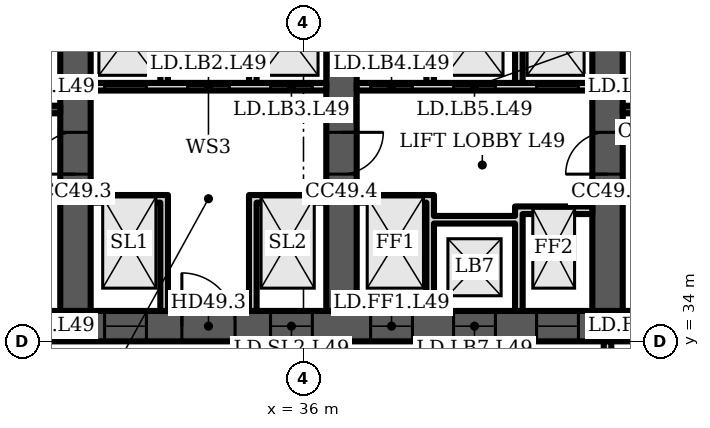
"""IFC4 building model, lengths in metres.
Left out: names, types, materials, properties, quantities, classifications, styles, units other than length and angle.
Written with IfcOpenShell. Run it as: python <this file> out.ifc"""

import sys

from ifc_helpers import new_model, si_unit, direction, frame, frame_2d, origin, place, context, subcontext, project, spatial, polyline, rectangle, outline, extrude, element, fill, save


model = new_model("IFC4")
c1 = context("Model", 3, precision=1e-05, world=origin(), true_north=direction((0.0, 1.0)))
c2 = subcontext(c1, "Body", "Model", "MODEL_VIEW")
j1 = project(units=[si_unit("LENGTHUNIT", "METRE"), si_unit("PLANEANGLEUNIT", "RADIAN")], contexts=[c1])
p1 = place(None, origin())
s1 = spatial("IfcSite", under=j1, at=p1, CompositionType="ELEMENT")
p2 = place(p1, origin())
s2 = spatial("IfcBuilding", under=s1, at=p2, CompositionType="ELEMENT")
p3 = place(p2, frame((0.0, 0.0, 198.7)))
s3 = spatial("IfcBuildingStorey", under=s2, at=p3, CompositionType="ELEMENT", Elevation=198.7)
p4 = place(p3, frame((16.0, 34.4, 0.0), z_axis=(0.0, 0.0, 1.0), x_axis=(1.0, 0.0, 0.0)))
e1 = element("IfcWall", 1, at=p4, inside=s3, PredefinedType="SHEAR", context=c2, shape_type="SweptSolid", body=[
    extrude(rectangle(XDim=42.0, YDim=0.8, at=frame_2d((21.0, 0.0))), origin(), (0.0, 0.0, 1.0), 3.6),
])
p5 = place(p4, frame((1.75, 0.0, 0.0)))
e2 = element("IfcOpeningElement", 2, at=p5, cuts=e1, PredefinedType="OPENING", context=c2, shape_type="SweptSolid", body=[
    extrude(rectangle(XDim=1.0, YDim=2.1, at=frame_2d((0.5, 1.05))), frame((0.0, 0.41, 0.0), z_axis=(0.0, -1.0, 0.0), x_axis=(1.0, 0.0, 0.0)), (0.0, 0.0, 1.0), 0.82),
])
p6 = place(p4, frame((4.65, 0.0, 0.0)))
e3 = element("IfcOpeningElement", 3, at=p6, cuts=e1, PredefinedType="OPENING", context=c2, shape_type="SweptSolid", body=[
    extrude(rectangle(XDim=1.0, YDim=2.1, at=frame_2d((0.5, 1.05))), frame((0.0, 0.41, 0.0), z_axis=(0.0, -1.0, 0.0), x_axis=(1.0, 0.0, 0.0)), (0.0, 0.0, 1.0), 0.82),
])
p7 = place(p4, frame((7.65, 0.0, 0.0)))
e4 = element("IfcOpeningElement", 4, at=p7, cuts=e1, PredefinedType="OPENING", context=c2, shape_type="SweptSolid", body=[
    extrude(rectangle(XDim=1.2, YDim=2.1, at=frame_2d((0.6, 1.05))), frame((0.0, 0.41, 0.0), z_axis=(0.0, -1.0, 0.0), x_axis=(1.0, 0.0, 0.0)), (0.0, 0.0, 1.0), 0.82),
])
p8 = place(p4, frame((14.767, 0.0, 0.0)))
e5 = element("IfcOpeningElement", 5, at=p8, cuts=e1, PredefinedType="OPENING", context=c2, shape_type="SweptSolid", body=[
    extrude(rectangle(XDim=1.1, YDim=2.1, at=frame_2d((0.55, 1.05))), frame((0.0, 0.41, 0.0), z_axis=(0.0, -1.0, 0.0), x_axis=(1.0, 0.0, 0.0)), (0.0, 0.0, 1.0), 0.82),
])
p9 = place(p4, frame((19.133, 0.0, 0.0)))
e6 = element("IfcOpeningElement", 6, at=p9, cuts=e1, PredefinedType="OPENING", context=c2, shape_type="SweptSolid", body=[
    extrude(rectangle(XDim=1.1, YDim=2.1, at=frame_2d((0.55, 1.05))), frame((0.0, 0.41, 0.0), z_axis=(0.0, -1.0, 0.0), x_axis=(1.0, 0.0, 0.0)), (0.0, 0.0, 1.0), 0.82),
])
p10 = place(p4, frame((16.8, 0.0, 0.0)))
e7 = element("IfcOpeningElement", 7, at=p10, cuts=e1, PredefinedType="OPENING", context=c2, shape_type="SweptSolid", body=[
    extrude(rectangle(XDim=1.4, YDim=2.1, at=frame_2d((0.7, 1.05))), frame((0.0, 0.41, 0.0), z_axis=(0.0, -1.0, 0.0), x_axis=(1.0, 0.0, 0.0)), (0.0, 0.0, 1.0), 0.82),
])
p11 = place(p4, frame((21.767, 0.0, 0.0)))
e8 = element("IfcOpeningElement", 8, at=p11, cuts=e1, PredefinedType="OPENING", context=c2, shape_type="SweptSolid", body=[
    extrude(rectangle(XDim=1.1, YDim=2.1, at=frame_2d((0.55, 1.05))), frame((0.0, 0.41, 0.0), z_axis=(0.0, -1.0, 0.0), x_axis=(1.0, 0.0, 0.0)), (0.0, 0.0, 1.0), 0.82),
])
p12 = place(p4, frame((23.95, 0.0, 0.0)))
e9 = element("IfcOpeningElement", 9, at=p12, cuts=e1, PredefinedType="OPENING", context=c2, shape_type="SweptSolid", body=[
    extrude(rectangle(XDim=1.1, YDim=2.1, at=frame_2d((0.55, 1.05))), frame((0.0, 0.41, 0.0), z_axis=(0.0, -1.0, 0.0), x_axis=(1.0, 0.0, 0.0)), (0.0, 0.0, 1.0), 0.82),
])
p13 = place(p4, frame((26.133, 0.0, 0.0)))
e10 = element("IfcOpeningElement", 10, at=p13, cuts=e1, PredefinedType="OPENING", context=c2, shape_type="SweptSolid", body=[
    extrude(rectangle(XDim=1.1, YDim=2.1, at=frame_2d((0.55, 1.05))), frame((0.0, 0.41, 0.0), z_axis=(0.0, -1.0, 0.0), x_axis=(1.0, 0.0, 0.0)), (0.0, 0.0, 1.0), 0.82),
])
p14 = place(p4, frame((33.15, 0.0, 0.0)))
e11 = element("IfcOpeningElement", 11, at=p14, cuts=e1, PredefinedType="OPENING", context=c2, shape_type="SweptSolid", body=[
    extrude(rectangle(XDim=1.2, YDim=2.1, at=frame_2d((0.6, 1.05))), frame((0.0, 0.41, 0.0), z_axis=(0.0, -1.0, 0.0), x_axis=(1.0, 0.0, 0.0)), (0.0, 0.0, 1.0), 0.82),
])
p15 = place(p4, frame((35.817, 0.0, 0.0)))
e12 = element("IfcOpeningElement", 12, at=p15, cuts=e1, PredefinedType="OPENING", context=c2, shape_type="SweptSolid", body=[
    extrude(rectangle(XDim=1.0, YDim=2.1, at=frame_2d((0.5, 1.05))), frame((0.0, 0.41, 0.0), z_axis=(0.0, -1.0, 0.0), x_axis=(1.0, 0.0, 0.0)), (0.0, 0.0, 1.0), 0.82),
])
p16 = place(p4, frame((39.95, 0.0, 0.0)))
e13 = element("IfcOpeningElement", 13, at=p16, cuts=e1, PredefinedType="OPENING", context=c2, shape_type="SweptSolid", body=[
    extrude(rectangle(XDim=1.0, YDim=2.1, at=frame_2d((0.5, 1.05))), frame((0.0, 0.41, 0.0), z_axis=(0.0, -1.0, 0.0), x_axis=(1.0, 0.0, 0.0)), (0.0, 0.0, 1.0), 0.82),
])
p17 = place(p4, frame((37.767, 0.0, 0.0)))
e14 = element("IfcOpeningElement", 14, at=p17, cuts=e1, PredefinedType="OPENING", context=c2, shape_type="SweptSolid", body=[
    extrude(rectangle(XDim=1.4, YDim=2.1, at=frame_2d((0.7, 1.05))), frame((0.0, 0.41, 0.0), z_axis=(0.0, -1.0, 0.0), x_axis=(1.0, 0.0, 0.0)), (0.0, 0.0, 1.0), 0.82),
])
p18 = place(p3, frame((30.0, 34.8, 0.0), z_axis=(0.0, 0.0, 1.0), x_axis=(0.0, 1.0, 0.0)))
e15 = element("IfcWall", 15, at=p18, inside=s3, PredefinedType="SHEAR", context=c2, shape_type="SweptSolid", body=[
    extrude(rectangle(XDim=14.374, YDim=0.8, at=frame_2d((7.187, 0.0))), origin(), (0.0, 0.0, 1.0), 3.6),
])
p19 = place(p18, frame((3.6, 0.0, 0.0)))
e16 = element("IfcOpeningElement", 16, at=p19, cuts=e15, PredefinedType="OPENING", context=c2, shape_type="SweptSolid", body=[
    extrude(rectangle(XDim=1.1, YDim=2.1, at=frame_2d((0.55, 1.05))), frame((0.0, 0.41, 0.0), z_axis=(0.0, -1.0, 0.0), x_axis=(1.0, 0.0, 0.0)), (0.0, 0.0, 1.0), 0.82),
])
p20 = place(p3, frame((37.0, 34.8, 0.0), z_axis=(0.0, 0.0, 1.0), x_axis=(0.0, 1.0, 0.0)))
e17 = element("IfcWall", 17, at=p20, inside=s3, PredefinedType="SHEAR", context=c2, shape_type="SweptSolid", body=[
    extrude(rectangle(XDim=14.987, YDim=0.8, at=frame_2d((7.493, 0.0))), origin(), (0.0, 0.0, 1.0), 3.6),
])
p21 = place(p20, frame((11.312, 0.0, 0.0)))
e18 = element("IfcOpeningElement", 18, at=p21, cuts=e17, PredefinedType="OPENING", context=c2, shape_type="SweptSolid", body=[
    extrude(rectangle(XDim=1.0, YDim=2.1, at=frame_2d((0.5, 1.05))), frame((0.0, 0.41, 0.0), z_axis=(0.0, -1.0, 0.0), x_axis=(1.0, 0.0, 0.0)), (0.0, 0.0, 1.0), 0.82),
])
p22 = place(p20, frame((3.6, 0.0, 0.0)))
e19 = element("IfcOpeningElement", 19, at=p22, cuts=e17, PredefinedType="OPENING", context=c2, shape_type="SweptSolid", body=[
    extrude(rectangle(XDim=1.1, YDim=2.1, at=frame_2d((0.55, 1.05))), frame((0.0, 0.41, 0.0), z_axis=(0.0, -1.0, 0.0), x_axis=(1.0, 0.0, 0.0)), (0.0, 0.0, 1.0), 0.82),
])
p23 = place(p3, frame((44.0, 34.8, 0.0), z_axis=(0.0, 0.0, 1.0), x_axis=(0.0, 1.0, 0.0)))
e20 = element("IfcWall", 20, at=p23, inside=s3, PredefinedType="SHEAR", context=c2, shape_type="SweptSolid", body=[
    extrude(rectangle(XDim=14.374, YDim=0.8, at=frame_2d((7.187, 0.0))), origin(), (0.0, 0.0, 1.0), 3.6),
])
p24 = place(p23, frame((11.312, 0.0, 0.0)))
e21 = element("IfcOpeningElement", 21, at=p24, cuts=e20, PredefinedType="OPENING", context=c2, shape_type="SweptSolid", body=[
    extrude(rectangle(XDim=1.0, YDim=2.1, at=frame_2d((0.5, 1.05))), frame((0.0, 0.41, 0.0), z_axis=(0.0, -1.0, 0.0), x_axis=(1.0, 0.0, 0.0)), (0.0, 0.0, 1.0), 0.82),
])
p25 = place(p23, frame((3.6, 0.0, 0.0)))
e22 = element("IfcOpeningElement", 22, at=p25, cuts=e20, PredefinedType="OPENING", context=c2, shape_type="SweptSolid", body=[
    extrude(rectangle(XDim=1.1, YDim=2.1, at=frame_2d((0.55, 1.05))), frame((0.0, 0.41, 0.0), z_axis=(0.0, -1.0, 0.0), x_axis=(1.0, 0.0, 0.0)), (0.0, 0.0, 1.0), 0.82),
])
p26 = place(p3, frame((23.4, 40.1, 0.0), z_axis=(0.0, 0.0, 1.0), x_axis=(1.0, 0.0, 0.0)))
e23 = element("IfcWall", 23, at=p26, inside=s3, PredefinedType="SHEAR", context=c2, shape_type="SweptSolid", body=[
    extrude(rectangle(XDim=6.2, YDim=0.2, at=frame_2d((3.1, 0.0))), origin(), (0.0, 0.0, 1.0), 3.15),
])
p27 = place(p26, frame((3.525, 0.0, 0.0)))
e24 = element("IfcOpeningElement", 24, at=p27, cuts=e23, PredefinedType="OPENING", context=c2, shape_type="SweptSolid", body=[
    extrude(rectangle(XDim=1.2, YDim=2.1, at=frame_2d((0.6, 1.05))), frame((0.0, 0.11, 0.0), z_axis=(0.0, -1.0, 0.0), x_axis=(1.0, 0.0, 0.0)), (0.0, 0.0, 1.0), 0.22),
])
p28 = place(p26, frame((0.575, 0.0, 0.0)))
e25 = element("IfcOpeningElement", 25, at=p28, cuts=e23, PredefinedType="OPENING", context=c2, shape_type="SweptSolid", body=[
    extrude(rectangle(XDim=0.9, YDim=2.1, at=frame_2d((0.45, 1.05))), frame((0.0, 0.11, 0.0), z_axis=(0.0, -1.0, 0.0), x_axis=(1.0, 0.0, 0.0)), (0.0, 0.0, 1.0), 0.22),
])
p29 = place(p3, frame((30.4, 40.7, 0.0), z_axis=(0.0, 0.0, 1.0), x_axis=(1.0, 0.0, 0.0)))
e26 = element("IfcWall", 26, at=p29, inside=s3, PredefinedType="PARTITIONING", context=c2, shape_type="SweptSolid", body=[
    extrude(rectangle(XDim=6.2, YDim=0.2, at=frame_2d((3.1, 0.0))), origin(), (0.0, 0.0, 1.0), 3.15),
])
p30 = place(p29, frame((0.367, 0.0, 0.0)))
e27 = element("IfcOpeningElement", 27, at=p30, cuts=e26, PredefinedType="OPENING", context=c2, shape_type="SweptSolid", body=[
    extrude(rectangle(XDim=1.1, YDim=2.1, at=frame_2d((0.55, 1.05))), frame((0.0, 0.11, 0.0), z_axis=(0.0, -1.0, 0.0), x_axis=(1.0, 0.0, 0.0)), (0.0, 0.0, 1.0), 0.22),
])
p31 = place(p29, frame((2.55, 0.0, 0.0)))
e28 = element("IfcOpeningElement", 28, at=p31, cuts=e26, PredefinedType="OPENING", context=c2, shape_type="SweptSolid", body=[
    extrude(rectangle(XDim=1.1, YDim=2.1, at=frame_2d((0.55, 1.05))), frame((0.0, 0.11, 0.0), z_axis=(0.0, -1.0, 0.0), x_axis=(1.0, 0.0, 0.0)), (0.0, 0.0, 1.0), 0.22),
])
p32 = place(p29, frame((4.733, 0.0, 0.0)))
e29 = element("IfcOpeningElement", 29, at=p32, cuts=e26, PredefinedType="OPENING", context=c2, shape_type="SweptSolid", body=[
    extrude(rectangle(XDim=1.1, YDim=2.1, at=frame_2d((0.55, 1.05))), frame((0.0, 0.11, 0.0), z_axis=(0.0, -1.0, 0.0), x_axis=(1.0, 0.0, 0.0)), (0.0, 0.0, 1.0), 0.22),
])
p33 = place(p3, origin())
e30 = element("IfcWall", 30, at=p33, inside=s3, PredefinedType="PARTITIONING", context=c2, shape_type="SweptSolid", body=[
    extrude(outline(polyline([(32.233, 37.65), (30.4, 37.65), (30.4, 37.85), (32.233, 37.85), (32.433, 37.85), (32.433, 34.8), (32.233, 34.8), (32.233, 37.65)])), origin(), (0.0, 0.0, 1.0), 3.15),
])
p34 = place(p3, origin())
e31 = element("IfcWall", 31, at=p34, inside=s3, PredefinedType="PARTITIONING", context=c2, shape_type="SweptSolid", body=[
    extrude(outline(polyline([(34.567, 37.85), (34.767, 37.85), (36.6, 37.85), (36.6, 37.65), (34.767, 37.65), (34.767, 34.8), (34.567, 34.8), (34.567, 37.85)])), origin(), (0.0, 0.0, 1.0), 3.15),
])
p35 = place(p3, origin())
e32 = element("IfcWall", 32, at=p35, inside=s3, PredefinedType="PARTITIONING", context=c2, shape_type="SweptSolid", body=[
    extrude(outline(polyline([(32.433, 40.8), (32.233, 40.8), (32.233, 43.8), (30.4, 43.8), (30.4, 44.0), (36.6, 44.0), (36.6, 43.8), (34.767, 43.8), (34.767, 40.8), (34.567, 40.8), (34.567, 43.8), (32.433, 43.8), (32.433, 40.8)])), origin(), (0.0, 0.0, 1.0), 3.15),
])
p36 = place(p3, frame((37.4, 40.7, 0.0), z_axis=(0.0, 0.0, 1.0), x_axis=(1.0, 0.0, 0.0)))
e33 = element("IfcWall", 33, at=p36, inside=s3, PredefinedType="PARTITIONING", context=c2, shape_type="SweptSolid", body=[
    extrude(rectangle(XDim=6.2, YDim=0.2, at=frame_2d((3.1, 0.0))), origin(), (0.0, 0.0, 1.0), 3.15),
])
p37 = place(p36, frame((0.367, 0.0, 0.0)))
e34 = element("IfcOpeningElement", 34, at=p37, cuts=e33, PredefinedType="OPENING", context=c2, shape_type="SweptSolid", body=[
    extrude(rectangle(XDim=1.1, YDim=2.1, at=frame_2d((0.55, 1.05))), frame((0.0, 0.11, 0.0), z_axis=(0.0, -1.0, 0.0), x_axis=(1.0, 0.0, 0.0)), (0.0, 0.0, 1.0), 0.22),
])
p38 = place(p36, frame((2.55, 0.0, 0.0)))
e35 = element("IfcOpeningElement", 35, at=p38, cuts=e33, PredefinedType="OPENING", context=c2, shape_type="SweptSolid", body=[
    extrude(rectangle(XDim=1.1, YDim=2.1, at=frame_2d((0.55, 1.05))), frame((0.0, 0.11, 0.0), z_axis=(0.0, -1.0, 0.0), x_axis=(1.0, 0.0, 0.0)), (0.0, 0.0, 1.0), 0.22),
])
p39 = place(p36, frame((4.733, 0.0, 0.0)))
e36 = element("IfcOpeningElement", 36, at=p39, cuts=e33, PredefinedType="OPENING", context=c2, shape_type="SweptSolid", body=[
    extrude(rectangle(XDim=1.1, YDim=2.1, at=frame_2d((0.55, 1.05))), frame((0.0, 0.11, 0.0), z_axis=(0.0, -1.0, 0.0), x_axis=(1.0, 0.0, 0.0)), (0.0, 0.0, 1.0), 0.22),
])
p40 = place(p3, origin())
e37 = element("IfcWall", 37, at=p40, inside=s3, PredefinedType="PARTITIONING", context=c2, shape_type="SweptSolid", body=[
    extrude(outline(polyline([(41.567, 37.1), (39.433, 37.1), (39.433, 34.8), (39.233, 34.8), (39.233, 37.65), (37.4, 37.65), (37.4, 37.85), (39.233, 37.85), (39.433, 37.85), (39.433, 37.3), (41.567, 37.3), (41.567, 37.55), (41.767, 37.55), (43.6, 37.55), (43.6, 37.35), (41.767, 37.35), (41.767, 34.8), (41.567, 34.8), (41.567, 37.1)])), origin(), (0.0, 0.0, 1.0), 3.15),
])
p41 = place(p3, origin())
e38 = element("IfcWall", 38, at=p41, inside=s3, PredefinedType="PARTITIONING", context=c2, shape_type="SweptSolid", body=[
    extrude(outline(polyline([(39.433, 40.8), (39.233, 40.8), (39.233, 43.8), (37.4, 43.8), (37.4, 44.0), (43.6, 44.0), (43.6, 43.8), (41.767, 43.8), (41.767, 40.8), (41.567, 40.8), (41.567, 43.8), (39.433, 43.8), (39.433, 40.8)])), origin(), (0.0, 0.0, 1.0), 3.15),
])
p42 = place(p3, frame((44.4, 40.1, 0.0), z_axis=(0.0, 0.0, 1.0), x_axis=(1.0, 0.0, 0.0)))
e39 = element("IfcWall", 39, at=p42, inside=s3, PredefinedType="SHEAR", context=c2, shape_type="SweptSolid", body=[
    extrude(rectangle(XDim=6.2, YDim=0.2, at=frame_2d((3.1, 0.0))), origin(), (0.0, 0.0, 1.0), 3.15),
])
p43 = place(p42, frame((3.525, 0.0, 0.0)))
e40 = element("IfcOpeningElement", 40, at=p43, cuts=e39, PredefinedType="OPENING", context=c2, shape_type="SweptSolid", body=[
    extrude(rectangle(XDim=1.2, YDim=2.1, at=frame_2d((0.6, 1.05))), frame((0.0, 0.11, 0.0), z_axis=(0.0, -1.0, 0.0), x_axis=(1.0, 0.0, 0.0)), (0.0, 0.0, 1.0), 0.22),
])
p44 = place(p42, frame((0.575, 0.0, 0.0)))
e41 = element("IfcOpeningElement", 41, at=p44, cuts=e39, PredefinedType="OPENING", context=c2, shape_type="SweptSolid", body=[
    extrude(rectangle(XDim=0.9, YDim=2.1, at=frame_2d((0.45, 1.05))), frame((0.0, 0.11, 0.0), z_axis=(0.0, -1.0, 0.0), x_axis=(1.0, 0.0, 0.0)), (0.0, 0.0, 1.0), 0.22),
])
p45 = place(p3, frame((37.0, 30.5, 0.0), z_axis=(0.0, 0.0, 1.0), x_axis=(0.0, 1.0, 0.0)))
e42 = element("IfcWall", 42, at=p45, inside=s3, PredefinedType="PARTITIONING", context=c2, shape_type="SweptSolid", body=[
    extrude(rectangle(XDim=3.5, YDim=0.2, at=frame_2d((1.75, 0.0))), origin(), (0.0, 0.0, 1.0), 3.15),
])
p46 = place(p45, frame((1.2, 0.0, 0.0)))
e43 = element("IfcOpeningElement", 43, at=p46, cuts=e42, PredefinedType="OPENING", context=c2, shape_type="SweptSolid", body=[
    extrude(rectangle(XDim=1.1, YDim=2.1, at=frame_2d((0.55, 1.05))), frame((0.0, 0.11, 0.0), z_axis=(0.0, -1.0, 0.0), x_axis=(1.0, 0.0, 0.0)), (0.0, 0.0, 1.0), 0.22),
])
for number, where, z_axis, x_axis in (
    (44, (40.0, 30.5, 0.0), (0.0, 0.0, 1.0), (0.0, 1.0, 0.0)),
    (45, (41.0, 30.5, 0.0), (0.0, 0.0, 1.0), (0.0, 1.0, 0.0)),
):
    element("IfcWall", number, at=place(p3, frame(where, z_axis=z_axis, x_axis=x_axis)), inside=s3, PredefinedType="PARTITIONING", context=c2, shape_type="SweptSolid", body=[
        extrude(rectangle(XDim=3.5, YDim=0.2, at=frame_2d((1.75, 0.0))), origin(), (0.0, 0.0, 1.0), 3.15),
    ])
p47 = place(p3, frame((44.0, 30.5, 0.0), z_axis=(0.0, 0.0, 1.0), x_axis=(0.0, 1.0, 0.0)))
e46 = element("IfcWall", 46, at=p47, inside=s3, PredefinedType="PARTITIONING", context=c2, shape_type="SweptSolid", body=[
    extrude(rectangle(XDim=3.5, YDim=0.2, at=frame_2d((1.75, 0.0))), origin(), (0.0, 0.0, 1.0), 3.15),
])
p48 = place(p47, frame((1.2, 0.0, 0.0)))
e47 = element("IfcOpeningElement", 47, at=p48, cuts=e46, PredefinedType="OPENING", context=c2, shape_type="SweptSolid", body=[
    extrude(rectangle(XDim=1.1, YDim=2.1, at=frame_2d((0.55, 1.05))), frame((0.0, 0.11, 0.0), z_axis=(0.0, -1.0, 0.0), x_axis=(1.0, 0.0, 0.0)), (0.0, 0.0, 1.0), 0.22),
])
p49 = place(p8, origin())
e48 = element("IfcDoor", 48, at=p49, inside=s3, OperationType="DOUBLE_DOOR_SLIDING", PredefinedType="DOOR", context=c2, shape_type="SweptSolid", body=[
    extrude(rectangle(XDim=1.1, YDim=2.1, at=frame_2d((0.55, 1.05))), frame((0.0, 0.025, 0.0), z_axis=(0.0, -1.0, 0.0), x_axis=(1.0, 0.0, 0.0)), (0.0, 0.0, 1.0), 0.05),
])
fill(e5, e48)
p50 = place(p9, origin())
e49 = element("IfcDoor", 49, at=p50, inside=s3, OperationType="DOUBLE_DOOR_SLIDING", PredefinedType="DOOR", context=c2, shape_type="SweptSolid", body=[
    extrude(rectangle(XDim=1.1, YDim=2.1, at=frame_2d((0.55, 1.05))), frame((0.0, 0.025, 0.0), z_axis=(0.0, -1.0, 0.0), x_axis=(1.0, 0.0, 0.0)), (0.0, 0.0, 1.0), 0.05),
])
fill(e6, e49)
p51 = place(p10, origin())
e50 = element("IfcDoor", 50, at=p51, inside=s3, OperationType="DOUBLE_DOOR_SINGLE_SWING", PredefinedType="DOOR", context=c2, shape_type="SweptSolid", body=[
    extrude(rectangle(XDim=1.4, YDim=2.1, at=frame_2d((0.7, 1.05))), frame((0.0, 0.025, 0.0), z_axis=(0.0, -1.0, 0.0), x_axis=(1.0, 0.0, 0.0)), (0.0, 0.0, 1.0), 0.05),
])
fill(e7, e50)
p52 = place(p30, origin())
e51 = element("IfcDoor", 51, at=p52, inside=s3, OperationType="DOUBLE_DOOR_SLIDING", PredefinedType="DOOR", context=c2, shape_type="SweptSolid", body=[
    extrude(rectangle(XDim=1.1, YDim=2.1, at=frame_2d((0.55, 1.05))), frame((0.0, 0.025, 0.0), z_axis=(0.0, -1.0, 0.0), x_axis=(1.0, 0.0, 0.0)), (0.0, 0.0, 1.0), 0.05),
])
fill(e27, e51)
p53 = place(p31, origin())
e52 = element("IfcDoor", 52, at=p53, inside=s3, OperationType="DOUBLE_DOOR_SLIDING", PredefinedType="DOOR", context=c2, shape_type="SweptSolid", body=[
    extrude(rectangle(XDim=1.1, YDim=2.1, at=frame_2d((0.55, 1.05))), frame((0.0, 0.025, 0.0), z_axis=(0.0, -1.0, 0.0), x_axis=(1.0, 0.0, 0.0)), (0.0, 0.0, 1.0), 0.05),
])
fill(e28, e52)
p54 = place(p32, origin())
e53 = element("IfcDoor", 53, at=p54, inside=s3, OperationType="DOUBLE_DOOR_SLIDING", PredefinedType="DOOR", context=c2, shape_type="SweptSolid", body=[
    extrude(rectangle(XDim=1.1, YDim=2.1, at=frame_2d((0.55, 1.05))), frame((0.0, 0.025, 0.0), z_axis=(0.0, -1.0, 0.0), x_axis=(1.0, 0.0, 0.0)), (0.0, 0.0, 1.0), 0.05),
])
fill(e29, e53)
p55 = place(p11, origin())
e54 = element("IfcDoor", 54, at=p55, inside=s3, OperationType="DOUBLE_DOOR_SLIDING", PredefinedType="DOOR", context=c2, shape_type="SweptSolid", body=[
    extrude(rectangle(XDim=1.1, YDim=2.1, at=frame_2d((0.55, 1.05))), frame((0.0, 0.025, 0.0), z_axis=(0.0, -1.0, 0.0), x_axis=(1.0, 0.0, 0.0)), (0.0, 0.0, 1.0), 0.05),
])
fill(e8, e54)
p56 = place(p12, origin())
e55 = element("IfcDoor", 55, at=p56, inside=s3, OperationType="DOUBLE_DOOR_SLIDING", PredefinedType="DOOR", context=c2, shape_type="SweptSolid", body=[
    extrude(rectangle(XDim=1.1, YDim=2.1, at=frame_2d((0.55, 1.05))), frame((0.0, 0.025, 0.0), z_axis=(0.0, -1.0, 0.0), x_axis=(1.0, 0.0, 0.0)), (0.0, 0.0, 1.0), 0.05),
])
fill(e9, e55)
p57 = place(p13, origin())
e56 = element("IfcDoor", 56, at=p57, inside=s3, OperationType="DOUBLE_DOOR_SLIDING", PredefinedType="DOOR", context=c2, shape_type="SweptSolid", body=[
    extrude(rectangle(XDim=1.1, YDim=2.1, at=frame_2d((0.55, 1.05))), frame((0.0, 0.025, 0.0), z_axis=(0.0, -1.0, 0.0), x_axis=(1.0, 0.0, 0.0)), (0.0, 0.0, 1.0), 0.05),
])
fill(e10, e56)
p58 = place(p37, origin())
e57 = element("IfcDoor", 57, at=p58, inside=s3, OperationType="DOUBLE_DOOR_SLIDING", PredefinedType="DOOR", context=c2, shape_type="SweptSolid", body=[
    extrude(rectangle(XDim=1.1, YDim=2.1, at=frame_2d((0.55, 1.05))), frame((0.0, 0.025, 0.0), z_axis=(0.0, -1.0, 0.0), x_axis=(1.0, 0.0, 0.0)), (0.0, 0.0, 1.0), 0.05),
])
fill(e34, e57)
p59 = place(p38, origin())
e58 = element("IfcDoor", 58, at=p59, inside=s3, OperationType="DOUBLE_DOOR_SLIDING", PredefinedType="DOOR", context=c2, shape_type="SweptSolid", body=[
    extrude(rectangle(XDim=1.1, YDim=2.1, at=frame_2d((0.55, 1.05))), frame((0.0, 0.025, 0.0), z_axis=(0.0, -1.0, 0.0), x_axis=(1.0, 0.0, 0.0)), (0.0, 0.0, 1.0), 0.05),
])
fill(e35, e58)
p60 = place(p39, origin())
e59 = element("IfcDoor", 59, at=p60, inside=s3, OperationType="DOUBLE_DOOR_SLIDING", PredefinedType="DOOR", context=c2, shape_type="SweptSolid", body=[
    extrude(rectangle(XDim=1.1, YDim=2.1, at=frame_2d((0.55, 1.05))), frame((0.0, 0.025, 0.0), z_axis=(0.0, -1.0, 0.0), x_axis=(1.0, 0.0, 0.0)), (0.0, 0.0, 1.0), 0.05),
])
fill(e36, e59)
p61 = place(p19, origin())
e60 = element("IfcDoor", 60, at=p61, inside=s3, OperationType="SINGLE_SWING_LEFT", PredefinedType="DOOR", context=c2, shape_type="SweptSolid", body=[
    extrude(rectangle(XDim=1.1, YDim=2.1, at=frame_2d((0.55, 1.05))), frame((0.0, 0.025, 0.0), z_axis=(0.0, -1.0, 0.0), x_axis=(1.0, 0.0, 0.0)), (0.0, 0.0, 1.0), 0.05),
])
fill(e16, e60)
p62 = place(p22, origin())
e61 = element("IfcDoor", 61, at=p62, inside=s3, OperationType="SINGLE_SWING_RIGHT", PredefinedType="DOOR", context=c2, shape_type="SweptSolid", body=[
    extrude(rectangle(XDim=1.1, YDim=2.1, at=frame_2d((0.55, 1.05))), frame((0.0, 0.025, 0.0), z_axis=(0.0, -1.0, 0.0), x_axis=(1.0, 0.0, 0.0)), (0.0, 0.0, 1.0), 0.05),
])
fill(e19, e61)
p63 = place(p25, origin())
e62 = element("IfcDoor", 62, at=p63, inside=s3, OperationType="SINGLE_SWING_LEFT", PredefinedType="DOOR", context=c2, shape_type="SweptSolid", body=[
    extrude(rectangle(XDim=1.1, YDim=2.1, at=frame_2d((0.55, 1.05))), frame((0.0, 0.025, 0.0), z_axis=(0.0, -1.0, 0.0), x_axis=(1.0, 0.0, 0.0)), (0.0, 0.0, 1.0), 0.05),
])
fill(e22, e62)
save(model, sys.argv[1])
